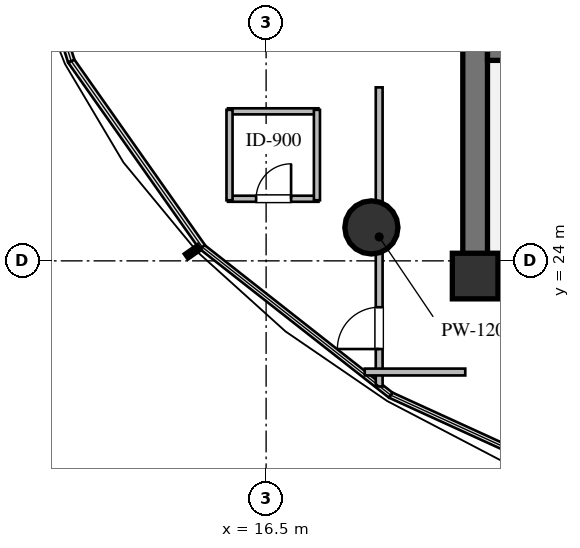
"""IFC4 building model, lengths in metres.
Left out: names, types, materials, properties, quantities, classifications, styles, units other than length and angle.
Written with IfcOpenShell. Run it as: python <this file> out.ifc"""

import sys

from ifc_helpers import new_model, si_unit, direction, frame, frame_2d, origin, origin_2d, place, context, subcontext, project, spatial, rectangle, circle, extrude, element, fill, save


model = new_model("IFC4")
c1 = context("Model", 3, precision=1e-05, world=origin(), true_north=direction((0.0, 1.0)))
c2 = subcontext(c1, "Body", "Model", "MODEL_VIEW")
j1 = project(units=[si_unit("LENGTHUNIT", "METRE"), si_unit("PLANEANGLEUNIT", "RADIAN")], contexts=[c1])
p1 = place(None, origin())
s1 = spatial("IfcSite", under=j1, at=p1, CompositionType="ELEMENT")
p2 = place(p1, origin())
s2 = spatial("IfcBuilding", under=s1, at=p2, CompositionType="ELEMENT")
p3 = place(p2, frame((0.0, 0.0, 34.8)))
s3 = spatial("IfcBuildingStorey", under=s2, at=p3, CompositionType="ELEMENT", Elevation=34.8)
p4 = place(p3, frame((21.675, 23.6, 0.0), z_axis=(0.0, 0.0, 1.0), x_axis=(1.0, 0.0, 0.0)))
e1 = element("IfcWall", 1, at=p4, inside=s3, PredefinedType="SHEAR", context=c2, shape_type="SweptSolid", body=[
    extrude(rectangle(XDim=22.65, YDim=0.65, at=frame_2d((11.325, 0.0))), origin(), (0.0, 0.0, 1.0), 3.36),
])
p5 = place(p3, frame((22.0, 23.925, 0.0), z_axis=(0.0, 0.0, 1.0), x_axis=(0.0, 1.0, 0.0)))
e2 = element("IfcWall", 2, at=p5, inside=s3, PredefinedType="SHEAR", context=c2, shape_type="SweptSolid", body=[
    extrude(rectangle(XDim=12.15, YDim=0.65, at=frame_2d((6.075, 0.0))), origin(), (0.0, 0.0, 1.0), 3.36),
])
p6 = place(p3, frame((22.325, 29.6, 0.0), z_axis=(0.0, 0.0, 1.0), x_axis=(1.0, 0.0, 0.0)))
e3 = element("IfcWall", 3, at=p6, inside=s3, PredefinedType="SHEAR", context=c2, shape_type="SweptSolid", body=[
    extrude(rectangle(XDim=21.35, YDim=0.65, at=frame_2d((10.675, 0.0))), origin(), (0.0, 0.0, 1.0), 3.36),
])
p7 = place(p6, frame((12.125, 0.0, 0.0)))
e4 = element("IfcOpeningElement", 4, at=p7, cuts=e3, PredefinedType="OPENING", context=c2, shape_type="SweptSolid", body=[
    extrude(rectangle(XDim=1.15, YDim=2.1, at=frame_2d((0.575, 1.05))), frame((0.0, 0.335, 0.0), z_axis=(0.0, -1.0, 0.0), x_axis=(1.0, 0.0, 0.0)), (0.0, 0.0, 1.0), 0.67),
])
p8 = place(p3, frame((22.0, 23.6, 0.0), z_axis=(0.0, 0.0, 1.0), x_axis=(1.0, 0.0, 0.0)))
e5 = element("IfcColumn", 5, at=p8, inside=s3, PredefinedType="COLUMN", context=c2, shape_type="SweptSolid", body=[
    extrude(rectangle(XDim=1.2, YDim=1.2, at=origin_2d()), origin(), (0.0, 0.0, 1.0), 3.6),
])
p9 = place(p3, frame((19.27, 24.88, 0.0), z_axis=(0.0, 0.0, 1.0), x_axis=(1.0, 0.0, 0.0)))
e6 = element("IfcColumn", 6, at=p9, inside=s3, PredefinedType="COLUMN", context=c2, shape_type="SweptSolid", body=[
    extrude(circle(Radius=0.7, at=origin_2d()), origin(), (0.0, 0.0, 1.0), 3.6),
])
p10 = place(p3, frame((15.497, 25.634, 0.0), z_axis=(0.0, 0.0, 1.0), x_axis=(1.0, 0.0, 0.0)))
e7 = element("IfcWall", 7, at=p10, inside=s3, PredefinedType="PLUMBINGWALL", context=c2, shape_type="SweptSolid", body=[
    extrude(rectangle(XDim=2.38, YDim=0.16, at=frame_2d((1.19, 0.0))), origin(), (0.0, 0.0, 1.0), 3.36),
])
p11 = place(p10, frame((0.74, 0.0, 0.0)))
e8 = element("IfcOpeningElement", 8, at=p11, cuts=e7, PredefinedType="OPENING", context=c2, shape_type="SweptSolid", body=[
    extrude(rectangle(XDim=0.92, YDim=2.1, at=frame_2d((0.46, 1.05))), frame((0.0, 0.09, 0.0), z_axis=(0.0, -1.0, 0.0), x_axis=(1.0, 0.0, 0.0)), (0.0, 0.0, 1.0), 0.18),
])
p12 = place(p3, frame((15.497, 27.934, 0.0), z_axis=(0.0, 0.0, 1.0), x_axis=(1.0, 0.0, 0.0)))
e9 = element("IfcWall", 9, at=p12, inside=s3, PredefinedType="PLUMBINGWALL", context=c2, shape_type="SweptSolid", body=[
    extrude(rectangle(XDim=2.38, YDim=0.16, at=frame_2d((1.19, 0.0))), origin(), (0.0, 0.0, 1.0), 3.36),
])
p13 = place(p3, frame((15.537, 25.594, 0.0), z_axis=(0.0, 0.0, 1.0), x_axis=(0.0, 1.0, 0.0)))
e10 = element("IfcWall", 10, at=p13, inside=s3, PredefinedType="PLUMBINGWALL", context=c2, shape_type="SweptSolid", body=[
    extrude(rectangle(XDim=2.38, YDim=0.16, at=frame_2d((1.19, 0.0))), origin(), (0.0, 0.0, 1.0), 3.36),
])
p14 = place(p3, frame((17.837, 25.594, 0.0), z_axis=(0.0, 0.0, 1.0), x_axis=(0.0, 1.0, 0.0)))
e11 = element("IfcWall", 11, at=p14, inside=s3, PredefinedType="PLUMBINGWALL", context=c2, shape_type="SweptSolid", body=[
    extrude(rectangle(XDim=2.38, YDim=0.16, at=frame_2d((1.19, 0.0))), origin(), (0.0, 0.0, 1.0), 2.738),
])
p15 = place(p3, frame((19.475, 20.695, 0.0), z_axis=(0.0, 0.0, 1.0), x_axis=(0.0, 1.0, 0.0)))
e12 = element("IfcWall", 12, at=p15, inside=s3, PredefinedType="PARTITIONING", context=c2, shape_type="SweptSolid", body=[
    extrude(rectangle(XDim=7.87, YDim=0.18, at=frame_2d((3.935, 0.0))), origin(), (0.0, 0.0, 1.0), 2.738),
])
p16 = place(p15, frame((0.985, 0.0, 0.0)))
e13 = element("IfcOpeningElement", 13, at=p16, cuts=e12, PredefinedType="OPENING", context=c2, shape_type="SweptSolid", body=[
    extrude(rectangle(XDim=1.1, YDim=2.1, at=frame_2d((0.55, 1.05))), frame((0.0, 0.1, 0.0), z_axis=(0.0, -1.0, 0.0), x_axis=(1.0, 0.0, 0.0)), (0.0, 0.0, 1.0), 0.2),
])
p17 = place(p3, frame((21.74, 21.075, 0.0), z_axis=(0.0, 0.0, 1.0), x_axis=(-1.0, 0.0, 0.0)))
e14 = element("IfcWall", 14, at=p17, inside=s3, PredefinedType="PARTITIONING", context=c2, shape_type="SweptSolid", body=[
    extrude(rectangle(XDim=2.645, YDim=0.18, at=frame_2d((1.323, 0.0))), origin(), (0.0, 0.0, 1.0), 3.36),
])
p18 = place(p11, origin())
e15 = element("IfcDoor", 15, at=p18, inside=s3, OperationType="SINGLE_SWING_RIGHT", PredefinedType="DOOR", context=c2, shape_type="SweptSolid", body=[
    extrude(rectangle(XDim=0.92, YDim=2.1, at=frame_2d((0.46, 1.05))), frame((0.0, 0.025, 0.0), z_axis=(0.0, -1.0, 0.0), x_axis=(1.0, 0.0, 0.0)), (0.0, 0.0, 1.0), 0.05),
])
fill(e8, e15)
p19 = place(p16, origin())
e16 = element("IfcDoor", 16, at=p19, inside=s3, OperationType="SINGLE_SWING_LEFT", PredefinedType="DOOR", context=c2, shape_type="SweptSolid", body=[
    extrude(rectangle(XDim=1.1, YDim=2.1, at=frame_2d((0.55, 1.05))), frame((0.0, 0.025, 0.0), z_axis=(0.0, -1.0, 0.0), x_axis=(1.0, 0.0, 0.0)), (0.0, 0.0, 1.0), 0.05),
])
fill(e13, e16)
save(model, sys.argv[1])
